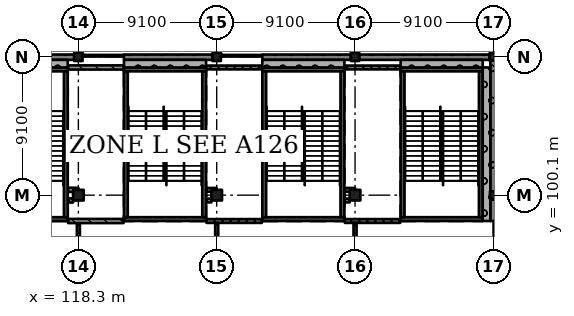
"""IFC4 building model, lengths in metres.
Left out: names, types, materials, properties, quantities, classifications, styles, units other than length and angle.
Written with IfcOpenShell. Run it as: python <this file> out.ifc"""

import sys

from ifc_helpers import new_model, si_unit, direction, frame, frame_2d, origin, origin_2d, place, context, subcontext, project, spatial, rectangle, extrude, element, fill, save


model = new_model("IFC4")
c1 = context("Model", 3, precision=1e-05, world=origin(), true_north=direction((0.0, 1.0)))
c2 = subcontext(c1, "Body", "Model", "MODEL_VIEW")
j1 = project(units=[si_unit("LENGTHUNIT", "METRE"), si_unit("PLANEANGLEUNIT", "RADIAN")], contexts=[c1])
p1 = place(None, origin())
s1 = spatial("IfcSite", under=j1, at=p1, CompositionType="ELEMENT")
p2 = place(p1, origin())
s2 = spatial("IfcBuilding", under=s1, at=p2, CompositionType="ELEMENT")
p3 = place(p2, frame((0.0, 0.0, 6.37)))
s3 = spatial("IfcBuildingStorey", under=s2, at=p3, CompositionType="ELEMENT", Elevation=6.37)
p4 = place(p3, frame((118.3, 100.1, 0.0), z_axis=(0.0, 0.0, 1.0), x_axis=(1.0, 0.0, 0.0)))
e1 = element("IfcColumn", 1, at=p4, inside=s3, PredefinedType="COLUMN", context=c2, shape_type="SweptSolid", body=[
    extrude(rectangle(XDim=0.7, YDim=0.7, at=origin_2d()), origin(), (0.0, 0.0, 1.0), 4.55),
])
p5 = place(p3, frame((118.3, 109.2, 0.0), z_axis=(0.0, 0.0, 1.0), x_axis=(1.0, 0.0, 0.0)))
e2 = element("IfcColumn", 2, at=p5, inside=s3, PredefinedType="COLUMN", context=c2, shape_type="SweptSolid", body=[
    extrude(rectangle(XDim=0.55, YDim=0.55, at=origin_2d()), origin(), (0.0, 0.0, 1.0), 4.55),
])
p6 = place(p3, frame((127.4, 100.1, 0.0), z_axis=(0.0, 0.0, 1.0), x_axis=(1.0, 0.0, 0.0)))
e3 = element("IfcColumn", 3, at=p6, inside=s3, PredefinedType="COLUMN", context=c2, shape_type="SweptSolid", body=[
    extrude(rectangle(XDim=0.7, YDim=0.7, at=origin_2d()), origin(), (0.0, 0.0, 1.0), 4.55),
])
p7 = place(p3, frame((127.4, 109.2, 0.0), z_axis=(0.0, 0.0, 1.0), x_axis=(1.0, 0.0, 0.0)))
e4 = element("IfcColumn", 4, at=p7, inside=s3, PredefinedType="COLUMN", context=c2, shape_type="SweptSolid", body=[
    extrude(rectangle(XDim=0.55, YDim=0.55, at=origin_2d()), origin(), (0.0, 0.0, 1.0), 4.55),
])
p8 = place(p3, frame((136.5, 100.1, 0.0), z_axis=(0.0, 0.0, 1.0), x_axis=(1.0, 0.0, 0.0)))
e5 = element("IfcColumn", 5, at=p8, inside=s3, PredefinedType="COLUMN", context=c2, shape_type="SweptSolid", body=[
    extrude(rectangle(XDim=0.7, YDim=0.7, at=origin_2d()), origin(), (0.0, 0.0, 1.0), 4.55),
])
p9 = place(p3, frame((136.5, 109.2, 0.0), z_axis=(0.0, 0.0, 1.0), x_axis=(1.0, 0.0, 0.0)))
e6 = element("IfcColumn", 6, at=p9, inside=s3, PredefinedType="COLUMN", context=c2, shape_type="SweptSolid", body=[
    extrude(rectangle(XDim=0.55, YDim=0.55, at=origin_2d()), origin(), (0.0, 0.0, 1.0), 4.55),
])
for number, where, z_axis, x_axis in (
    (7, (145.625, 100.1, 0.0), (0.0, 0.0, 1.0), (1.0, 0.0, 0.0)),
    (8, (145.6, 109.2, 0.0), (0.0, 0.0, 1.0), (1.0, 0.0, 0.0)),
):
    element("IfcColumn", number, at=place(p3, frame(where, z_axis=z_axis, x_axis=x_axis)), inside=s3, PredefinedType="COLUMN", context=c2, shape_type="SweptSolid", body=[
        extrude(rectangle(XDim=0.5, YDim=0.5, at=origin_2d()), origin(), (0.0, 0.0, 1.0), 4.55),
    ])
p10 = place(p3, frame((144.9, 98.525, 0.0), z_axis=(0.0, 0.0, 1.0), x_axis=(-1.0, 0.0, 0.0)))
e9 = element("IfcWall", 9, at=p10, inside=s3, PredefinedType="SHEAR", context=c2, shape_type="SweptSolid", body=[
    extrude(rectangle(XDim=5.4, YDim=0.25, at=frame_2d((2.7, 0.0))), origin(), (0.0, 0.0, 1.0), 4.55),
])
p11 = place(p10, frame((1.5, 0.0, 0.0)))
e10 = element("IfcOpeningElement", 10, at=p11, cuts=e9, PredefinedType="OPENING", context=c2, shape_type="SweptSolid", body=[
    extrude(rectangle(XDim=2.4, YDim=2.1, at=frame_2d((1.2, 1.05))), frame((0.0, 0.135, 0.0), z_axis=(0.0, -1.0, 0.0), x_axis=(1.0, 0.0, 0.0)), (0.0, 0.0, 1.0), 0.27),
])
p12 = place(p3, frame((144.9, 108.375, 0.0), z_axis=(0.0, 0.0, 1.0), x_axis=(-1.0, 0.0, 0.0)))
e11 = element("IfcWall", 11, at=p12, inside=s3, PredefinedType="SHEAR", context=c2, shape_type="SweptSolid", body=[
    extrude(rectangle(XDim=5.4, YDim=0.25, at=frame_2d((2.7, 0.0))), origin(), (0.0, 0.0, 1.0), 4.55),
])
for number, where, z_axis, x_axis in (
    (12, (139.625, 108.25, 0.0), (0.0, 0.0, 1.0), (0.0, -1.0, 0.0)),
    (13, (144.775, 108.25, 0.0), (0.0, 0.0, 1.0), (0.0, -1.0, 0.0)),
):
    element("IfcWall", number, at=place(p3, frame(where, z_axis=z_axis, x_axis=x_axis)), inside=s3, PredefinedType="SHEAR", context=c2, shape_type="SweptSolid", body=[
        extrude(rectangle(XDim=9.6, YDim=0.25, at=frame_2d((4.8, 0.0))), origin(), (0.0, 0.0, 1.0), 4.55),
    ])
p13 = place(p3, frame((135.8, 98.525, 0.0), z_axis=(0.0, 0.0, 1.0), x_axis=(-1.0, 0.0, 0.0)))
e14 = element("IfcWall", 14, at=p13, inside=s3, PredefinedType="SHEAR", context=c2, shape_type="SweptSolid", body=[
    extrude(rectangle(XDim=5.4, YDim=0.25, at=frame_2d((2.7, 0.0))), origin(), (0.0, 0.0, 1.0), 4.55),
])
p14 = place(p13, frame((1.5, 0.0, 0.0)))
e15 = element("IfcOpeningElement", 15, at=p14, cuts=e14, PredefinedType="OPENING", context=c2, shape_type="SweptSolid", body=[
    extrude(rectangle(XDim=2.4, YDim=2.1, at=frame_2d((1.2, 1.05))), frame((0.0, 0.135, 0.0), z_axis=(0.0, -1.0, 0.0), x_axis=(1.0, 0.0, 0.0)), (0.0, 0.0, 1.0), 0.27),
])
p15 = place(p3, frame((135.8, 108.375, 0.0), z_axis=(0.0, 0.0, 1.0), x_axis=(-1.0, 0.0, 0.0)))
e16 = element("IfcWall", 16, at=p15, inside=s3, PredefinedType="SHEAR", context=c2, shape_type="SweptSolid", body=[
    extrude(rectangle(XDim=5.4, YDim=0.25, at=frame_2d((2.7, 0.0))), origin(), (0.0, 0.0, 1.0), 4.55),
])
for number, where, z_axis, x_axis in (
    (17, (130.525, 108.25, 0.0), (0.0, 0.0, 1.0), (0.0, -1.0, 0.0)),
    (18, (135.675, 108.25, 0.0), (0.0, 0.0, 1.0), (0.0, -1.0, 0.0)),
):
    element("IfcWall", number, at=place(p3, frame(where, z_axis=z_axis, x_axis=x_axis)), inside=s3, PredefinedType="SHEAR", context=c2, shape_type="SweptSolid", body=[
        extrude(rectangle(XDim=9.6, YDim=0.25, at=frame_2d((4.8, 0.0))), origin(), (0.0, 0.0, 1.0), 4.55),
    ])
p16 = place(p3, frame((126.7, 98.525, 0.0), z_axis=(0.0, 0.0, 1.0), x_axis=(-1.0, 0.0, 0.0)))
e19 = element("IfcWall", 19, at=p16, inside=s3, PredefinedType="SHEAR", context=c2, shape_type="SweptSolid", body=[
    extrude(rectangle(XDim=5.4, YDim=0.25, at=frame_2d((2.7, 0.0))), origin(), (0.0, 0.0, 1.0), 4.55),
])
p17 = place(p16, frame((1.5, 0.0, 0.0)))
e20 = element("IfcOpeningElement", 20, at=p17, cuts=e19, PredefinedType="OPENING", context=c2, shape_type="SweptSolid", body=[
    extrude(rectangle(XDim=2.4, YDim=2.1, at=frame_2d((1.2, 1.05))), frame((0.0, 0.135, 0.0), z_axis=(0.0, -1.0, 0.0), x_axis=(1.0, 0.0, 0.0)), (0.0, 0.0, 1.0), 0.27),
])
p18 = place(p3, frame((126.7, 108.375, 0.0), z_axis=(0.0, 0.0, 1.0), x_axis=(-1.0, 0.0, 0.0)))
e21 = element("IfcWall", 21, at=p18, inside=s3, PredefinedType="SHEAR", context=c2, shape_type="SweptSolid", body=[
    extrude(rectangle(XDim=5.4, YDim=0.25, at=frame_2d((2.7, 0.0))), origin(), (0.0, 0.0, 1.0), 4.55),
])
for number, where, z_axis, x_axis in (
    (22, (121.425, 108.25, 0.0), (0.0, 0.0, 1.0), (0.0, -1.0, 0.0)),
    (23, (126.575, 108.25, 0.0), (0.0, 0.0, 1.0), (0.0, -1.0, 0.0)),
):
    element("IfcWall", number, at=place(p3, frame(where, z_axis=z_axis, x_axis=x_axis)), inside=s3, PredefinedType="SHEAR", context=c2, shape_type="SweptSolid", body=[
        extrude(rectangle(XDim=9.6, YDim=0.25, at=frame_2d((4.8, 0.0))), origin(), (0.0, 0.0, 1.0), 4.55),
    ])
p19 = place(p3, frame((117.6, 98.525, 0.0), z_axis=(0.0, 0.0, 1.0), x_axis=(-1.0, 0.0, 0.0)))
e24 = element("IfcWall", 24, at=p19, inside=s3, PredefinedType="SHEAR", context=c2, shape_type="SweptSolid", body=[
    extrude(rectangle(XDim=5.4, YDim=0.25, at=frame_2d((2.7, 0.0))), origin(), (0.0, 0.0, 1.0), 4.55),
])
p20 = place(p19, frame((1.5, 0.0, 0.0)))
e25 = element("IfcOpeningElement", 25, at=p20, cuts=e24, PredefinedType="OPENING", context=c2, shape_type="SweptSolid", body=[
    extrude(rectangle(XDim=2.4, YDim=2.1, at=frame_2d((1.2, 1.05))), frame((0.0, 0.135, 0.0), z_axis=(0.0, -1.0, 0.0), x_axis=(1.0, 0.0, 0.0)), (0.0, 0.0, 1.0), 0.27),
])
p21 = place(p3, frame((117.6, 108.375, 0.0), z_axis=(0.0, 0.0, 1.0), x_axis=(-1.0, 0.0, 0.0)))
e26 = element("IfcWall", 26, at=p21, inside=s3, PredefinedType="SHEAR", context=c2, shape_type="SweptSolid", body=[
    extrude(rectangle(XDim=5.4, YDim=0.25, at=frame_2d((2.7, 0.0))), origin(), (0.0, 0.0, 1.0), 4.55),
])
p22 = place(p3, frame((117.475, 108.25, 0.0), z_axis=(0.0, 0.0, 1.0), x_axis=(0.0, -1.0, 0.0)))
e27 = element("IfcWall", 27, at=p22, inside=s3, PredefinedType="SHEAR", context=c2, shape_type="SweptSolid", body=[
    extrude(rectangle(XDim=9.6, YDim=0.25, at=frame_2d((4.8, 0.0))), origin(), (0.0, 0.0, 1.0), 4.55),
])
p23 = place(p3, frame((145.575, 98.4, 0.0), z_axis=(0.0, 0.0, 1.0), x_axis=(0.0, 1.0, 0.0)))
e28 = element("IfcWall", 28, at=p23, inside=s3, PredefinedType="SOLIDWALL", context=c2, shape_type="SweptSolid", body=[
    extrude(rectangle(XDim=1.45, YDim=0.35, at=frame_2d((0.725, 0.0))), origin(), (0.0, 0.0, 1.0), 3.5),
])
p24 = place(p3, frame((145.575, 100.35, 0.0), z_axis=(0.0, 0.0, 1.0), x_axis=(0.0, 1.0, 0.0)))
e29 = element("IfcWall", 29, at=p24, inside=s3, PredefinedType="SOLIDWALL", context=c2, shape_type="SweptSolid", body=[
    extrude(rectangle(XDim=8.6, YDim=0.35, at=frame_2d((4.3, 0.0))), origin(), (0.0, 0.0, 1.0), 3.5),
])
p25 = place(p3, frame((145.35, 109.175, 0.0), z_axis=(0.0, 0.0, 1.0), x_axis=(-1.0, 0.0, 0.0)))
e30 = element("IfcWall", 30, at=p25, inside=s3, PredefinedType="SOLIDWALL", context=c2, shape_type="SweptSolid", body=[
    extrude(rectangle(XDim=8.575, YDim=0.35, at=frame_2d((4.288, 0.0))), origin(), (0.0, 0.0, 1.0), 3.5),
])
p26 = place(p3, frame((136.225, 109.175, 0.0), z_axis=(0.0, 0.0, 1.0), x_axis=(-1.0, 0.0, 0.0)))
e31 = element("IfcWall", 31, at=p26, inside=s3, PredefinedType="SOLIDWALL", context=c2, shape_type="SweptSolid", body=[
    extrude(rectangle(XDim=5.825, YDim=0.35, at=frame_2d((2.913, 0.0))), origin(), (0.0, 0.0, 1.0), 3.5),
])
for number, where, z_axis, x_axis in (
    (32, (127.125, 109.175, 0.0), (0.0, 0.0, 1.0), (-1.0, 0.0, 0.0)),
    (33, (118.025, 109.175, 0.0), (0.0, 0.0, 1.0), (-1.0, 0.0, 0.0)),
):
    element("IfcWall", number, at=place(p3, frame(where, z_axis=z_axis, x_axis=x_axis)), inside=s3, PredefinedType="SOLIDWALL", context=c2, shape_type="SweptSolid", body=[
        extrude(rectangle(XDim=5.825, YDim=0.35, at=frame_2d((2.913, 0.0))), origin(), (0.0, 0.0, 1.0), 3.5),
    ])
p27 = place(p3, frame((139.5, 108.75, 0.0), z_axis=(0.0, 0.0, 1.0), x_axis=(1.0, 0.0, 0.0)))
e34 = element("IfcWall", 34, at=p27, inside=s3, PredefinedType="SOLIDWALL", context=c2, shape_type="SweptSolid", body=[
    extrude(rectangle(XDim=5.4, YDim=0.5, at=frame_2d((2.7, 0.0))), origin(), (0.0, 0.0, 1.0), 4.55),
])
p28 = place(p3, frame((145.15, 98.4, 0.0), z_axis=(0.0, 0.0, 1.0), x_axis=(0.0, 1.0, 0.0)))
e35 = element("IfcWall", 35, at=p28, inside=s3, PredefinedType="SOLIDWALL", context=c2, shape_type="SweptSolid", body=[
    extrude(rectangle(XDim=10.1, YDim=0.5, at=frame_2d((5.05, 0.0))), origin(), (0.0, 0.0, 1.0), 4.55),
])
p29 = place(p3, frame((130.4, 108.75, 0.0), z_axis=(0.0, 0.0, 1.0), x_axis=(1.0, 0.0, 0.0)))
e36 = element("IfcWall", 36, at=p29, inside=s3, PredefinedType="SOLIDWALL", context=c2, shape_type="SweptSolid", body=[
    extrude(rectangle(XDim=5.4, YDim=0.5, at=frame_2d((2.7, 0.0))), origin(), (0.0, 0.0, 1.0), 4.55),
])
p30 = place(p3, frame((121.3, 108.75, 0.0), z_axis=(0.0, 0.0, 1.0), x_axis=(1.0, 0.0, 0.0)))
e37 = element("IfcWall", 37, at=p30, inside=s3, PredefinedType="SOLIDWALL", context=c2, shape_type="SweptSolid", body=[
    extrude(rectangle(XDim=5.4, YDim=0.5, at=frame_2d((2.7, 0.0))), origin(), (0.0, 0.0, 1.0), 4.55),
])
p31 = place(p3, frame((112.2, 108.75, 0.0), z_axis=(0.0, 0.0, 1.0), x_axis=(1.0, 0.0, 0.0)))
e38 = element("IfcWall", 38, at=p31, inside=s3, PredefinedType="SOLIDWALL", context=c2, shape_type="SweptSolid", body=[
    extrude(rectangle(XDim=5.4, YDim=0.5, at=frame_2d((2.7, 0.0))), origin(), (0.0, 0.0, 1.0), 4.55),
])
p32 = place(p3, frame((117.63, 98.4, 0.0), z_axis=(0.0, 0.0, 1.0), x_axis=(1.0, 0.0, 0.0)))
e39 = element("IfcWall", 39, at=p32, inside=s3, PredefinedType="SOLIDWALL", context=c2, shape_type="SweptSolid", body=[
    extrude(rectangle(XDim=3.64, YDim=0.275, at=frame_2d((1.82, 0.0))), origin(), (0.0, 0.0, 1.0), 4.25),
])
p33 = place(p32, frame((1.52, 0.0, 0.0)))
e40 = element("IfcOpeningElement", 40, at=p33, cuts=e39, PredefinedType="OPENING", context=c2, shape_type="SweptSolid", body=[
    extrude(rectangle(XDim=1.2, YDim=2.4, at=frame_2d((0.6, 1.2))), frame((0.0, 0.147, 0.0), z_axis=(0.0, -1.0, 0.0), x_axis=(1.0, 0.0, 0.0)), (0.0, 0.0, 1.0), 0.295),
])
p34 = place(p3, frame((117.63, 99.75, 0.0), z_axis=(0.0, 0.0, 1.0), x_axis=(1.0, 0.0, 0.0)))
e41 = element("IfcWall", 41, at=p34, inside=s3, PredefinedType="SOLIDWALL", context=c2, shape_type="SweptSolid", body=[
    extrude(rectangle(XDim=0.32, YDim=0.275, at=frame_2d((0.16, 0.0))), origin(), (0.0, 0.0, 1.0), 4.25),
])
p35 = place(p3, frame((117.63, 100.45, 0.0), z_axis=(0.0, 0.0, 1.0), x_axis=(1.0, 0.0, 0.0)))
e42 = element("IfcWall", 42, at=p35, inside=s3, PredefinedType="SOLIDWALL", context=c2, shape_type="SweptSolid", body=[
    extrude(rectangle(XDim=0.67, YDim=0.275, at=frame_2d((0.335, 0.0))), origin(), (0.0, 0.0, 1.0), 4.25),
])
p36 = place(p3, frame((117.63, 108.5, 0.0), z_axis=(0.0, 0.0, 1.0), x_axis=(1.0, 0.0, 0.0)))
e43 = element("IfcWall", 43, at=p36, inside=s3, PredefinedType="SOLIDWALL", context=c2, shape_type="SweptSolid", body=[
    extrude(rectangle(XDim=3.64, YDim=0.275, at=frame_2d((1.82, 0.0))), origin(), (0.0, 0.0, 1.0), 4.25),
])
p37 = place(p3, frame((118.3, 91.425, 0.0), z_axis=(0.0, 0.0, 1.0), x_axis=(0.0, 1.0, 0.0)))
e44 = element("IfcWall", 44, at=p37, inside=s3, PredefinedType="PARTITIONING", context=c2, shape_type="SweptSolid", body=[
    extrude(rectangle(XDim=6.837, YDim=0.2, at=frame_2d((3.419, 0.0))), origin(), (0.0, 0.0, 1.0), 3.55),
])
p38 = place(p37, frame((0.85, 0.0, 0.0)))
e45 = element("IfcOpeningElement", 45, at=p38, cuts=e44, PredefinedType="OPENING", context=c2, shape_type="SweptSolid", body=[
    extrude(rectangle(XDim=1.8, YDim=2.4, at=frame_2d((0.9, 1.2))), frame((0.0, 0.11, 0.0), z_axis=(0.0, -1.0, 0.0), x_axis=(1.0, 0.0, 0.0)), (0.0, 0.0, 1.0), 0.22),
])
p39 = place(p37, frame((4.25, 0.0, 0.0)))
e46 = element("IfcOpeningElement", 46, at=p39, cuts=e44, PredefinedType="OPENING", context=c2, shape_type="SweptSolid", body=[
    extrude(rectangle(XDim=1.8, YDim=2.4, at=frame_2d((0.9, 1.2))), frame((0.0, 0.11, 0.0), z_axis=(0.0, -1.0, 0.0), x_axis=(1.0, 0.0, 0.0)), (0.0, 0.0, 1.0), 0.22),
])
p40 = place(p3, frame((126.73, 98.4, 0.0), z_axis=(0.0, 0.0, 1.0), x_axis=(1.0, 0.0, 0.0)))
e47 = element("IfcWall", 47, at=p40, inside=s3, PredefinedType="SOLIDWALL", context=c2, shape_type="SweptSolid", body=[
    extrude(rectangle(XDim=3.64, YDim=0.25, at=frame_2d((1.82, 0.0))), origin(), (0.0, 0.0, 1.0), 4.25),
])
p41 = place(p40, frame((1.72, 0.0, 0.0)))
e48 = element("IfcOpeningElement", 48, at=p41, cuts=e47, PredefinedType="OPENING", context=c2, shape_type="SweptSolid", body=[
    extrude(rectangle(XDim=0.8, YDim=2.1, at=frame_2d((0.4, 1.05))), frame((0.0, 0.135, 0.0), z_axis=(0.0, -1.0, 0.0), x_axis=(1.0, 0.0, 0.0)), (0.0, 0.0, 1.0), 0.27),
])
p42 = place(p3, frame((126.73, 99.75, 0.0), z_axis=(0.0, 0.0, 1.0), x_axis=(1.0, 0.0, 0.0)))
e49 = element("IfcWall", 49, at=p42, inside=s3, PredefinedType="SOLIDWALL", context=c2, shape_type="SweptSolid", body=[
    extrude(rectangle(XDim=0.32, YDim=0.25, at=frame_2d((0.16, 0.0))), origin(), (0.0, 0.0, 1.0), 4.25),
])
p43 = place(p3, frame((126.73, 100.45, 0.0), z_axis=(0.0, 0.0, 1.0), x_axis=(1.0, 0.0, 0.0)))
e50 = element("IfcWall", 50, at=p43, inside=s3, PredefinedType="SOLIDWALL", context=c2, shape_type="SweptSolid", body=[
    extrude(rectangle(XDim=0.67, YDim=0.25, at=frame_2d((0.335, 0.0))), origin(), (0.0, 0.0, 1.0), 4.25),
])
p44 = place(p3, frame((126.73, 108.5, 0.0), z_axis=(0.0, 0.0, 1.0), x_axis=(1.0, 0.0, 0.0)))
e51 = element("IfcWall", 51, at=p44, inside=s3, PredefinedType="SOLIDWALL", context=c2, shape_type="SweptSolid", body=[
    extrude(rectangle(XDim=3.64, YDim=0.25, at=frame_2d((1.82, 0.0))), origin(), (0.0, 0.0, 1.0), 4.25),
])
p45 = place(p3, frame((127.4, 91.425, 0.0), z_axis=(0.0, 0.0, 1.0), x_axis=(0.0, 1.0, 0.0)))
e52 = element("IfcWall", 52, at=p45, inside=s3, PredefinedType="PARTITIONING", context=c2, shape_type="SweptSolid", body=[
    extrude(rectangle(XDim=6.85, YDim=0.2, at=frame_2d((3.425, 0.0))), origin(), (0.0, 0.0, 1.0), 3.55),
])
p46 = place(p45, frame((0.85, 0.0, 0.0)))
e53 = element("IfcOpeningElement", 53, at=p46, cuts=e52, PredefinedType="OPENING", context=c2, shape_type="SweptSolid", body=[
    extrude(rectangle(XDim=1.8, YDim=2.4, at=frame_2d((0.9, 1.2))), frame((0.0, 0.11, 0.0), z_axis=(0.0, -1.0, 0.0), x_axis=(1.0, 0.0, 0.0)), (0.0, 0.0, 1.0), 0.22),
])
p47 = place(p45, frame((4.25, 0.0, 0.0)))
e54 = element("IfcOpeningElement", 54, at=p47, cuts=e52, PredefinedType="OPENING", context=c2, shape_type="SweptSolid", body=[
    extrude(rectangle(XDim=1.8, YDim=2.4, at=frame_2d((0.9, 1.2))), frame((0.0, 0.11, 0.0), z_axis=(0.0, -1.0, 0.0), x_axis=(1.0, 0.0, 0.0)), (0.0, 0.0, 1.0), 0.22),
])
p48 = place(p3, frame((135.83, 98.4, 0.0), z_axis=(0.0, 0.0, 1.0), x_axis=(1.0, 0.0, 0.0)))
e55 = element("IfcWall", 55, at=p48, inside=s3, PredefinedType="SOLIDWALL", context=c2, shape_type="SweptSolid", body=[
    extrude(rectangle(XDim=3.64, YDim=0.25, at=frame_2d((1.82, 0.0))), origin(), (0.0, 0.0, 1.0), 4.25),
])
p49 = place(p48, frame((1.62, 0.0, 0.0)))
e56 = element("IfcOpeningElement", 56, at=p49, cuts=e55, PredefinedType="OPENING", context=c2, shape_type="SweptSolid", body=[
    extrude(rectangle(XDim=1.0, YDim=2.1, at=frame_2d((0.5, 1.05))), frame((0.0, 0.135, 0.0), z_axis=(0.0, -1.0, 0.0), x_axis=(1.0, 0.0, 0.0)), (0.0, 0.0, 1.0), 0.27),
])
p50 = place(p3, frame((135.83, 99.75, 0.0), z_axis=(0.0, 0.0, 1.0), x_axis=(1.0, 0.0, 0.0)))
e57 = element("IfcWall", 57, at=p50, inside=s3, PredefinedType="SOLIDWALL", context=c2, shape_type="SweptSolid", body=[
    extrude(rectangle(XDim=0.32, YDim=0.25, at=frame_2d((0.16, 0.0))), origin(), (0.0, 0.0, 1.0), 4.25),
])
p51 = place(p3, frame((135.83, 100.45, 0.0), z_axis=(0.0, 0.0, 1.0), x_axis=(1.0, 0.0, 0.0)))
e58 = element("IfcWall", 58, at=p51, inside=s3, PredefinedType="SOLIDWALL", context=c2, shape_type="SweptSolid", body=[
    extrude(rectangle(XDim=0.67, YDim=0.25, at=frame_2d((0.335, 0.0))), origin(), (0.0, 0.0, 1.0), 4.25),
])
p52 = place(p3, frame((135.83, 108.5, 0.0), z_axis=(0.0, 0.0, 1.0), x_axis=(1.0, 0.0, 0.0)))
e59 = element("IfcWall", 59, at=p52, inside=s3, PredefinedType="SOLIDWALL", context=c2, shape_type="SweptSolid", body=[
    extrude(rectangle(XDim=3.64, YDim=0.25, at=frame_2d((1.82, 0.0))), origin(), (0.0, 0.0, 1.0), 4.25),
])
p53 = place(p3, frame((136.5, 91.4, 0.0), z_axis=(0.0, 0.0, 1.0), x_axis=(0.0, 1.0, 0.0)))
e60 = element("IfcWall", 60, at=p53, inside=s3, PredefinedType="PARTITIONING", context=c2, shape_type="SweptSolid", body=[
    extrude(rectangle(XDim=6.875, YDim=0.2, at=frame_2d((3.438, 0.0))), origin(), (0.0, 0.0, 1.0), 3.55),
])
p54 = place(p53, frame((0.85, 0.0, 0.0)))
e61 = element("IfcOpeningElement", 61, at=p54, cuts=e60, PredefinedType="OPENING", context=c2, shape_type="SweptSolid", body=[
    extrude(rectangle(XDim=1.8, YDim=2.4, at=frame_2d((0.9, 1.2))), frame((0.0, 0.11, 0.0), z_axis=(0.0, -1.0, 0.0), x_axis=(1.0, 0.0, 0.0)), (0.0, 0.0, 1.0), 0.22),
])
p55 = place(p53, frame((4.25, 0.0, 0.0)))
e62 = element("IfcOpeningElement", 62, at=p55, cuts=e60, PredefinedType="OPENING", context=c2, shape_type="SweptSolid", body=[
    extrude(rectangle(XDim=1.8, YDim=2.4, at=frame_2d((0.9, 1.2))), frame((0.0, 0.11, 0.0), z_axis=(0.0, -1.0, 0.0), x_axis=(1.0, 0.0, 0.0)), (0.0, 0.0, 1.0), 0.22),
])
p56 = place(p49, origin())
e63 = element("IfcDoor", 63, at=p56, inside=s3, OperationType="SINGLE_SWING_RIGHT", PredefinedType="DOOR", context=c2, shape_type="SweptSolid", body=[
    extrude(rectangle(XDim=1.0, YDim=2.1, at=frame_2d((0.5, 1.05))), frame((0.0, 0.025, 0.0), z_axis=(0.0, -1.0, 0.0), x_axis=(1.0, 0.0, 0.0)), (0.0, 0.0, 1.0), 0.05),
])
fill(e56, e63)
p57 = place(p41, origin())
e64 = element("IfcDoor", 64, at=p57, inside=s3, OperationType="SINGLE_SWING_RIGHT", PredefinedType="DOOR", context=c2, shape_type="SweptSolid", body=[
    extrude(rectangle(XDim=0.8, YDim=2.1, at=frame_2d((0.4, 1.05))), frame((0.0, 0.025, 0.0), z_axis=(0.0, -1.0, 0.0), x_axis=(1.0, 0.0, 0.0)), (0.0, 0.0, 1.0), 0.05),
])
fill(e48, e64)
p58 = place(p33, origin())
e65 = element("IfcDoor", 65, at=p58, inside=s3, OperationType="SINGLE_SWING_RIGHT", PredefinedType="DOOR", context=c2, shape_type="SweptSolid", body=[
    extrude(rectangle(XDim=1.2, YDim=2.4, at=frame_2d((0.6, 1.2))), frame((0.0, 0.025, 0.0), z_axis=(0.0, -1.0, 0.0), x_axis=(1.0, 0.0, 0.0)), (0.0, 0.0, 1.0), 0.05),
])
fill(e40, e65)
p59 = place(p55, origin())
e66 = element("IfcDoor", 66, at=p59, inside=s3, OperationType="DOUBLE_DOOR_SINGLE_SWING", PredefinedType="DOOR", context=c2, shape_type="SweptSolid", body=[
    extrude(rectangle(XDim=1.8, YDim=2.4, at=frame_2d((0.9, 1.2))), frame((0.0, 0.025, 0.0), z_axis=(0.0, -1.0, 0.0), x_axis=(1.0, 0.0, 0.0)), (0.0, 0.0, 1.0), 0.05),
])
fill(e62, e66)
p60 = place(p47, origin())
e67 = element("IfcDoor", 67, at=p60, inside=s3, OperationType="DOUBLE_DOOR_SINGLE_SWING", PredefinedType="DOOR", context=c2, shape_type="SweptSolid", body=[
    extrude(rectangle(XDim=1.8, YDim=2.4, at=frame_2d((0.9, 1.2))), frame((0.0, 0.025, 0.0), z_axis=(0.0, -1.0, 0.0), x_axis=(1.0, 0.0, 0.0)), (0.0, 0.0, 1.0), 0.05),
])
fill(e54, e67)
p61 = place(p39, origin())
e68 = element("IfcDoor", 68, at=p61, inside=s3, OperationType="DOUBLE_DOOR_SINGLE_SWING", PredefinedType="DOOR", context=c2, shape_type="SweptSolid", body=[
    extrude(rectangle(XDim=1.8, YDim=2.4, at=frame_2d((0.9, 1.2))), frame((0.0, 0.025, 0.0), z_axis=(0.0, -1.0, 0.0), x_axis=(1.0, 0.0, 0.0)), (0.0, 0.0, 1.0), 0.05),
])
fill(e46, e68)
p62 = place(p11, origin())
e69 = element("IfcDoor", 69, at=p62, inside=s3, OperationType="DOUBLE_DOOR_SINGLE_SWING", PredefinedType="DOOR", context=c2, shape_type="SweptSolid", body=[
    extrude(rectangle(XDim=2.4, YDim=2.1, at=frame_2d((1.2, 1.05))), frame((0.0, 0.025, 0.0), z_axis=(0.0, -1.0, 0.0), x_axis=(1.0, 0.0, 0.0)), (0.0, 0.0, 1.0), 0.05),
])
fill(e10, e69)
p63 = place(p14, origin())
e70 = element("IfcDoor", 70, at=p63, inside=s3, OperationType="DOUBLE_DOOR_SINGLE_SWING", PredefinedType="DOOR", context=c2, shape_type="SweptSolid", body=[
    extrude(rectangle(XDim=2.4, YDim=2.1, at=frame_2d((1.2, 1.05))), frame((0.0, 0.025, 0.0), z_axis=(0.0, -1.0, 0.0), x_axis=(1.0, 0.0, 0.0)), (0.0, 0.0, 1.0), 0.05),
])
fill(e15, e70)
p64 = place(p17, origin())
e71 = element("IfcDoor", 71, at=p64, inside=s3, OperationType="DOUBLE_DOOR_SINGLE_SWING", PredefinedType="DOOR", context=c2, shape_type="SweptSolid", body=[
    extrude(rectangle(XDim=2.4, YDim=2.1, at=frame_2d((1.2, 1.05))), frame((0.0, 0.025, 0.0), z_axis=(0.0, -1.0, 0.0), x_axis=(1.0, 0.0, 0.0)), (0.0, 0.0, 1.0), 0.05),
])
fill(e20, e71)
save(model, sys.argv[1])
